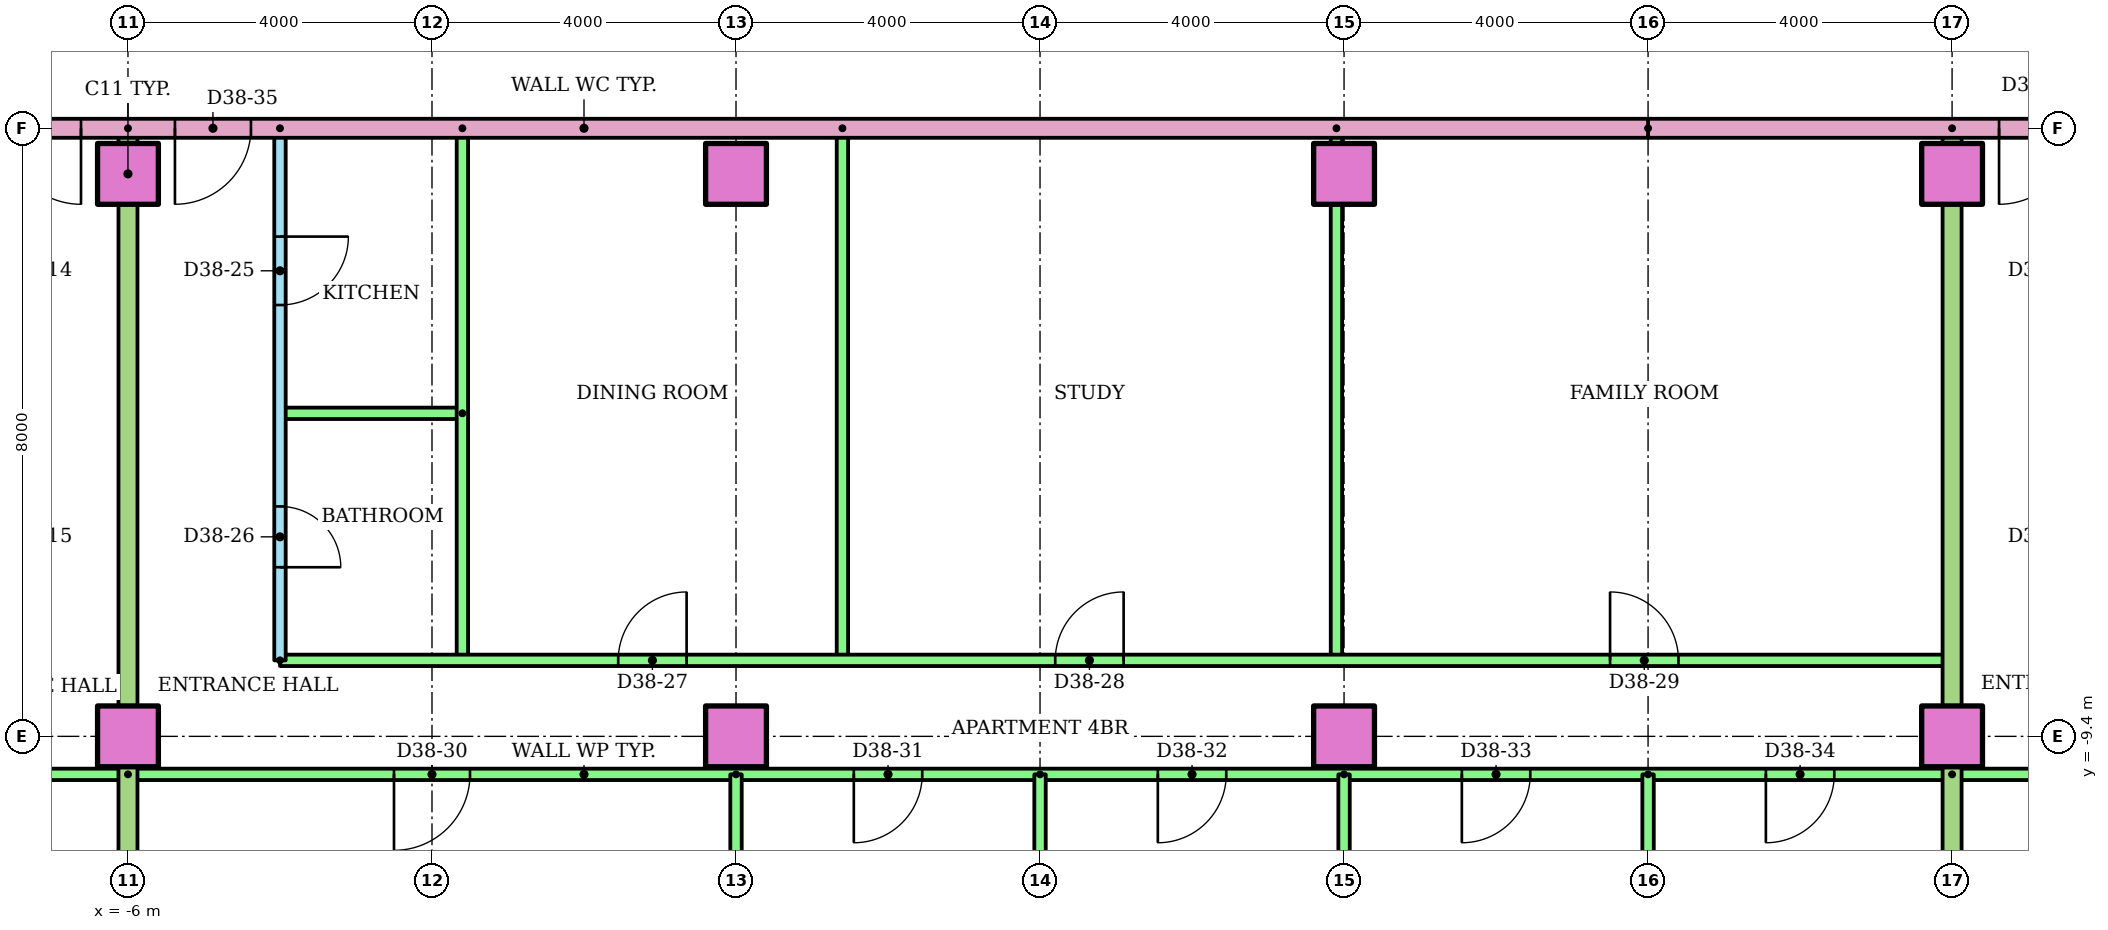
"""IFC4 building model, lengths in metres.
Left out: names, types, materials, properties, quantities, classifications, styles, units other than length and angle.
Written with IfcOpenShell. Run it as: python <this file> out.ifc"""

import sys

from ifc_helpers import new_model, si_unit, direction, frame, frame_2d, origin, origin_2d, place, context, subcontext, project, spatial, rectangle, extrude, element, fill, save


model = new_model("IFC4")
c1 = context("Model", 3, precision=1e-05, world=origin(), true_north=direction((0.0, 1.0)))
c2 = subcontext(c1, "Body", "Model", "MODEL_VIEW")
j1 = project(units=[si_unit("LENGTHUNIT", "METRE"), si_unit("PLANEANGLEUNIT", "RADIAN")], contexts=[c1])
p1 = place(None, origin())
s1 = spatial("IfcSite", under=j1, at=p1, CompositionType="ELEMENT")
p2 = place(p1, origin())
s2 = spatial("IfcBuilding", under=s1, at=p2, CompositionType="ELEMENT")
p3 = place(p2, frame((0.0, 0.0, 145.4)))
s3 = spatial("IfcBuildingStorey", under=s2, at=p3, CompositionType="ELEMENT", Elevation=145.4)
for number, where in (
    (1, (-6.0, -9.4, 0.0)),
    (2, (2.0, -9.4, 0.0)),
    (3, (10.0, -9.4, 0.0)),
    (4, (18.0, -9.4, 0.0)),
    (5, (-6.0, -2.0, 0.0)),
    (6, (2.0, -2.0, 0.0)),
    (7, (10.0, -2.0, 0.0)),
    (8, (18.0, -2.0, 0.0)),
):
    element("IfcColumn", number, at=place(p3, frame(where)), inside=s3, PredefinedType="COLUMN", context=c2, shape_type="SweptSolid", body=[
        extrude(rectangle(XDim=0.8, YDim=0.8, at=origin_2d()), origin(), (0.0, 0.0, 1.0), 3.2),
    ])
p4 = place(p3, frame((-6.0, -9.9, 0.0), z_axis=(0.0, 0.0, 1.0), x_axis=(-1.0, 0.0, 0.0)))
e9 = element("IfcWall", 9, at=p4, inside=s3, PredefinedType="PARTITIONING", context=c2, shape_type="SweptSolid", body=[
    extrude(rectangle(XDim=26.72, YDim=0.15, at=frame_2d((13.36, 0.0))), origin(), (0.0, 0.0, 1.0), 2.4),
])
p5 = place(p4, frame((20.75, 0.0, 0.0)))
e10 = element("IfcOpeningElement", 10, at=p5, cuts=e9, PredefinedType="OPENING", context=c2, shape_type="SweptSolid", body=[
    extrude(rectangle(XDim=1.0, YDim=2.1, at=frame_2d((0.5, 1.05))), frame((0.0, 0.085, 0.0), z_axis=(0.0, -1.0, 0.0), x_axis=(1.0, 0.0, 0.0)), (0.0, 0.0, 1.0), 0.17),
])
p6 = place(p4, frame((13.55, 0.0, 0.0)))
e11 = element("IfcOpeningElement", 11, at=p6, cuts=e9, PredefinedType="OPENING", context=c2, shape_type="SweptSolid", body=[
    extrude(rectangle(XDim=0.9, YDim=2.1, at=frame_2d((0.45, 1.05))), frame((0.0, 0.085, 0.0), z_axis=(0.0, -1.0, 0.0), x_axis=(1.0, 0.0, 0.0)), (0.0, 0.0, 1.0), 0.17),
])
p7 = place(p4, frame((9.55, 0.0, 0.0)))
e12 = element("IfcOpeningElement", 12, at=p7, cuts=e9, PredefinedType="OPENING", context=c2, shape_type="SweptSolid", body=[
    extrude(rectangle(XDim=0.9, YDim=2.1, at=frame_2d((0.45, 1.05))), frame((0.0, 0.085, 0.0), z_axis=(0.0, -1.0, 0.0), x_axis=(1.0, 0.0, 0.0)), (0.0, 0.0, 1.0), 0.17),
])
p8 = place(p4, frame((5.55, 0.0, 0.0)))
e13 = element("IfcOpeningElement", 13, at=p8, cuts=e9, PredefinedType="OPENING", context=c2, shape_type="SweptSolid", body=[
    extrude(rectangle(XDim=0.9, YDim=2.1, at=frame_2d((0.45, 1.05))), frame((0.0, 0.085, 0.0), z_axis=(0.0, -1.0, 0.0), x_axis=(1.0, 0.0, 0.0)), (0.0, 0.0, 1.0), 0.17),
])
p9 = place(p4, frame((1.55, 0.0, 0.0)))
e14 = element("IfcOpeningElement", 14, at=p9, cuts=e9, PredefinedType="OPENING", context=c2, shape_type="SweptSolid", body=[
    extrude(rectangle(XDim=0.9, YDim=2.1, at=frame_2d((0.45, 1.05))), frame((0.0, 0.085, 0.0), z_axis=(0.0, -1.0, 0.0), x_axis=(1.0, 0.0, 0.0)), (0.0, 0.0, 1.0), 0.17),
])
p10 = place(p3, frame((-4.0, -1.4, 0.0), z_axis=(0.0, 0.0, 1.0), x_axis=(0.0, -1.0, 0.0)))
e15 = element("IfcWall", 15, at=p10, inside=s3, PredefinedType="PARTITIONING", context=c2, shape_type="SweptSolid", body=[
    extrude(rectangle(XDim=7.0, YDim=0.15, at=frame_2d((3.5, 0.0))), origin(), (0.0, 0.0, 1.0), 2.4),
])
p11 = place(p10, frame((1.425, 0.0, 0.0)))
e16 = element("IfcOpeningElement", 16, at=p11, cuts=e15, PredefinedType="OPENING", context=c2, shape_type="SweptSolid", body=[
    extrude(rectangle(XDim=0.9, YDim=2.1, at=frame_2d((0.45, 1.05))), frame((0.0, 0.085, 0.0), z_axis=(0.0, -1.0, 0.0), x_axis=(1.0, 0.0, 0.0)), (0.0, 0.0, 1.0), 0.17),
])
p12 = place(p10, frame((4.975, 0.0, 0.0)))
e17 = element("IfcOpeningElement", 17, at=p12, cuts=e15, PredefinedType="OPENING", context=c2, shape_type="SweptSolid", body=[
    extrude(rectangle(XDim=0.8, YDim=2.1, at=frame_2d((0.4, 1.05))), frame((0.0, 0.085, 0.0), z_axis=(0.0, -1.0, 0.0), x_axis=(1.0, 0.0, 0.0)), (0.0, 0.0, 1.0), 0.17),
])
p13 = place(p3, frame((-1.6, -5.15, 0.0), z_axis=(0.0, 0.0, 1.0), x_axis=(-1.0, 0.0, 0.0)))
e18 = element("IfcWall", 18, at=p13, inside=s3, PredefinedType="PARTITIONING", context=c2, shape_type="SweptSolid", body=[
    extrude(rectangle(XDim=2.4, YDim=0.15, at=frame_2d((1.2, 0.0))), origin(), (0.0, 0.0, 1.0), 2.4),
])
for number, where, z_axis, x_axis in (
    (19, (-1.6, -1.4, 0.0), (0.0, 0.0, 1.0), (0.0, -1.0, 0.0)),
    (20, (3.4, -1.4, 0.0), (0.0, 0.0, 1.0), (0.0, -1.0, 0.0)),
    (21, (9.9, -1.4, 0.0), (0.0, 0.0, 1.0), (0.0, -1.0, 0.0)),
):
    element("IfcWall", number, at=place(p3, frame(where, z_axis=z_axis, x_axis=x_axis)), inside=s3, PredefinedType="PARTITIONING", context=c2, shape_type="SweptSolid", body=[
        extrude(rectangle(XDim=7.0, YDim=0.15, at=frame_2d((3.5, 0.0))), origin(), (0.0, 0.0, 1.0), 2.4),
    ])
p14 = place(p3, frame((-4.0, -8.4, 0.0)))
e22 = element("IfcWall", 22, at=p14, inside=s3, PredefinedType="PARTITIONING", context=c2, shape_type="SweptSolid", body=[
    extrude(rectangle(XDim=22.0, YDim=0.15, at=frame_2d((11.0, 0.0))), origin(), (0.0, 0.0, 1.0), 2.4),
])
p15 = place(p14, frame((4.45, 0.0, 0.0)))
e23 = element("IfcOpeningElement", 23, at=p15, cuts=e22, PredefinedType="OPENING", context=c2, shape_type="SweptSolid", body=[
    extrude(rectangle(XDim=0.9, YDim=2.1, at=frame_2d((0.45, 1.05))), frame((0.0, 0.085, 0.0), z_axis=(0.0, -1.0, 0.0), x_axis=(1.0, 0.0, 0.0)), (0.0, 0.0, 1.0), 0.17),
])
p16 = place(p14, frame((10.2, 0.0, 0.0)))
e24 = element("IfcOpeningElement", 24, at=p16, cuts=e22, PredefinedType="OPENING", context=c2, shape_type="SweptSolid", body=[
    extrude(rectangle(XDim=0.9, YDim=2.1, at=frame_2d((0.45, 1.05))), frame((0.0, 0.085, 0.0), z_axis=(0.0, -1.0, 0.0), x_axis=(1.0, 0.0, 0.0)), (0.0, 0.0, 1.0), 0.17),
])
p17 = place(p14, frame((17.5, 0.0, 0.0)))
e25 = element("IfcOpeningElement", 25, at=p17, cuts=e22, PredefinedType="OPENING", context=c2, shape_type="SweptSolid", body=[
    extrude(rectangle(XDim=0.9, YDim=2.1, at=frame_2d((0.45, 1.05))), frame((0.0, 0.085, 0.0), z_axis=(0.0, -1.0, 0.0), x_axis=(1.0, 0.0, 0.0)), (0.0, 0.0, 1.0), 0.17),
])
p18 = place(p3, frame((18.0, -9.9, 0.0), z_axis=(0.0, 0.0, 1.0), x_axis=(-1.0, 0.0, 0.0)))
e26 = element("IfcWall", 26, at=p18, inside=s3, PredefinedType="PARTITIONING", context=c2, shape_type="SweptSolid", body=[
    extrude(rectangle(XDim=24.0, YDim=0.15, at=frame_2d((12.0, 0.0))), origin(), (0.0, 0.0, 1.0), 2.4),
])
p19 = place(p18, frame((19.5, 0.0, 0.0)))
e27 = element("IfcOpeningElement", 27, at=p19, cuts=e26, PredefinedType="OPENING", context=c2, shape_type="SweptSolid", body=[
    extrude(rectangle(XDim=1.0, YDim=2.1, at=frame_2d((0.5, 1.05))), frame((0.0, 0.085, 0.0), z_axis=(0.0, -1.0, 0.0), x_axis=(1.0, 0.0, 0.0)), (0.0, 0.0, 1.0), 0.17),
])
p20 = place(p18, frame((13.55, 0.0, 0.0)))
e28 = element("IfcOpeningElement", 28, at=p20, cuts=e26, PredefinedType="OPENING", context=c2, shape_type="SweptSolid", body=[
    extrude(rectangle(XDim=0.9, YDim=2.1, at=frame_2d((0.45, 1.05))), frame((0.0, 0.085, 0.0), z_axis=(0.0, -1.0, 0.0), x_axis=(1.0, 0.0, 0.0)), (0.0, 0.0, 1.0), 0.17),
])
p21 = place(p18, frame((9.55, 0.0, 0.0)))
e29 = element("IfcOpeningElement", 29, at=p21, cuts=e26, PredefinedType="OPENING", context=c2, shape_type="SweptSolid", body=[
    extrude(rectangle(XDim=0.9, YDim=2.1, at=frame_2d((0.45, 1.05))), frame((0.0, 0.085, 0.0), z_axis=(0.0, -1.0, 0.0), x_axis=(1.0, 0.0, 0.0)), (0.0, 0.0, 1.0), 0.17),
])
p22 = place(p18, frame((5.55, 0.0, 0.0)))
e30 = element("IfcOpeningElement", 30, at=p22, cuts=e26, PredefinedType="OPENING", context=c2, shape_type="SweptSolid", body=[
    extrude(rectangle(XDim=0.9, YDim=2.1, at=frame_2d((0.45, 1.05))), frame((0.0, 0.085, 0.0), z_axis=(0.0, -1.0, 0.0), x_axis=(1.0, 0.0, 0.0)), (0.0, 0.0, 1.0), 0.17),
])
p23 = place(p18, frame((1.55, 0.0, 0.0)))
e31 = element("IfcOpeningElement", 31, at=p23, cuts=e26, PredefinedType="OPENING", context=c2, shape_type="SweptSolid", body=[
    extrude(rectangle(XDim=0.9, YDim=2.1, at=frame_2d((0.45, 1.05))), frame((0.0, 0.085, 0.0), z_axis=(0.0, -1.0, 0.0), x_axis=(1.0, 0.0, 0.0)), (0.0, 0.0, 1.0), 0.17),
])
p24 = place(p3, frame((2.0, -9.9, 0.0), z_axis=(0.0, 0.0, 1.0), x_axis=(0.0, -1.0, 0.0)))
e32 = element("IfcWall", 32, at=p24, inside=s3, PredefinedType="PARTITIONING", context=c2, shape_type="SweptSolid", body=[
    extrude(rectangle(XDim=6.41, YDim=0.15, at=frame_2d((3.205, 0.0))), origin(), (0.0, 0.0, 1.0), 2.4),
])
p25 = place(p3, frame((6.0, -9.9, 0.0), z_axis=(0.0, 0.0, 1.0), x_axis=(0.0, -1.0, 0.0)))
e33 = element("IfcWall", 33, at=p25, inside=s3, PredefinedType="PARTITIONING", context=c2, shape_type="SweptSolid", body=[
    extrude(rectangle(XDim=6.421, YDim=0.15, at=frame_2d((3.21, 0.0))), origin(), (0.0, 0.0, 1.0), 2.4),
])
p26 = place(p3, frame((10.0, -9.9, 0.0), z_axis=(0.0, 0.0, 1.0), x_axis=(0.0, -1.0, 0.0)))
e34 = element("IfcWall", 34, at=p26, inside=s3, PredefinedType="PARTITIONING", context=c2, shape_type="SweptSolid", body=[
    extrude(rectangle(XDim=6.41, YDim=0.15, at=frame_2d((3.205, 0.0))), origin(), (0.0, 0.0, 1.0), 2.4),
])
p27 = place(p3, frame((14.0, -9.9, 0.0), z_axis=(0.0, 0.0, 1.0), x_axis=(0.0, -1.0, 0.0)))
e35 = element("IfcWall", 35, at=p27, inside=s3, PredefinedType="PARTITIONING", context=c2, shape_type="SweptSolid", body=[
    extrude(rectangle(XDim=6.421, YDim=0.15, at=frame_2d((3.21, 0.0))), origin(), (0.0, 0.0, 1.0), 2.4),
])
p28 = place(p3, frame((-6.0, -1.4, 0.0), z_axis=(0.0, 0.0, 1.0), x_axis=(0.0, -1.0, 0.0)))
e36 = element("IfcWall", 36, at=p28, inside=s3, PredefinedType="PARTITIONING", context=c2, shape_type="SweptSolid", body=[
    extrude(rectangle(XDim=14.91, YDim=0.25, at=frame_2d((7.455, 0.0))), origin(), (0.0, 0.0, 1.0), 2.4),
])
p29 = place(p3, frame((32.72, -9.9, 0.0), z_axis=(0.0, 0.0, 1.0), x_axis=(-1.0, 0.0, 0.0)))
e37 = element("IfcWall", 37, at=p29, inside=s3, PredefinedType="PARTITIONING", context=c2, shape_type="SweptSolid", body=[
    extrude(rectangle(XDim=14.72, YDim=0.15, at=frame_2d((7.36, 0.0))), origin(), (0.0, 0.0, 1.0), 2.4),
])
p30 = place(p29, frame((12.27, 0.0, 0.0)))
e38 = element("IfcOpeningElement", 38, at=p30, cuts=e37, PredefinedType="OPENING", context=c2, shape_type="SweptSolid", body=[
    extrude(rectangle(XDim=0.9, YDim=2.1, at=frame_2d((0.45, 1.05))), frame((0.0, 0.085, 0.0), z_axis=(0.0, -1.0, 0.0), x_axis=(1.0, 0.0, 0.0)), (0.0, 0.0, 1.0), 0.17),
])
p31 = place(p29, frame((8.22, 0.0, 0.0)))
e39 = element("IfcOpeningElement", 39, at=p31, cuts=e37, PredefinedType="OPENING", context=c2, shape_type="SweptSolid", body=[
    extrude(rectangle(XDim=1.0, YDim=2.1, at=frame_2d((0.5, 1.05))), frame((0.0, 0.085, 0.0), z_axis=(0.0, -1.0, 0.0), x_axis=(1.0, 0.0, 0.0)), (0.0, 0.0, 1.0), 0.17),
])
p32 = place(p29, frame((3.02, 0.0, 0.0)))
e40 = element("IfcOpeningElement", 40, at=p32, cuts=e37, PredefinedType="OPENING", context=c2, shape_type="SweptSolid", body=[
    extrude(rectangle(XDim=0.9, YDim=2.1, at=frame_2d((0.45, 1.05))), frame((0.0, 0.085, 0.0), z_axis=(0.0, -1.0, 0.0), x_axis=(1.0, 0.0, 0.0)), (0.0, 0.0, 1.0), 0.17),
])
p33 = place(p3, frame((18.0, -1.4, 0.0), z_axis=(0.0, 0.0, 1.0), x_axis=(0.0, -1.0, 0.0)))
e41 = element("IfcWall", 41, at=p33, inside=s3, PredefinedType="PARTITIONING", context=c2, shape_type="SweptSolid", body=[
    extrude(rectangle(XDim=14.91, YDim=0.25, at=frame_2d((7.455, 0.0))), origin(), (0.0, 0.0, 1.0), 2.4),
])
p34 = place(p3, frame((29.0, -1.4, 0.0), z_axis=(0.0, 0.0, 1.0), x_axis=(-1.0, 0.0, 0.0)))
e42 = element("IfcWall", 42, at=p34, inside=s3, PredefinedType="PARTITIONING", context=c2, shape_type="SweptSolid", body=[
    extrude(rectangle(XDim=15.0, YDim=0.25, at=frame_2d((7.5, 0.0))), origin(), (0.0, 0.0, 1.0), 2.4),
])
p35 = place(p34, frame((9.382, 0.0, 0.0)))
e43 = element("IfcOpeningElement", 43, at=p35, cuts=e42, PredefinedType="OPENING", context=c2, shape_type="SweptSolid", body=[
    extrude(rectangle(XDim=1.0, YDim=2.1, at=frame_2d((0.5, 1.05))), frame((0.0, 0.135, 0.0), z_axis=(0.0, -1.0, 0.0), x_axis=(1.0, 0.0, 0.0)), (0.0, 0.0, 1.0), 0.27),
])
p36 = place(p3, frame((14.0, -1.4, 0.0), z_axis=(0.0, 0.0, 1.0), x_axis=(-1.0, 0.0, 0.0)))
e44 = element("IfcWall", 44, at=p36, inside=s3, PredefinedType="PARTITIONING", context=c2, shape_type="SweptSolid", body=[
    extrude(rectangle(XDim=28.0, YDim=0.25, at=frame_2d((14.0, 0.0))), origin(), (0.0, 0.0, 1.0), 2.4),
])
p37 = place(p36, frame((20.618, 0.0, 0.0)))
e45 = element("IfcOpeningElement", 45, at=p37, cuts=e44, PredefinedType="OPENING", context=c2, shape_type="SweptSolid", body=[
    extrude(rectangle(XDim=1.0, YDim=2.1, at=frame_2d((0.5, 1.05))), frame((0.0, 0.135, 0.0), z_axis=(0.0, -1.0, 0.0), x_axis=(1.0, 0.0, 0.0)), (0.0, 0.0, 1.0), 0.27),
])
p38 = place(p36, frame((18.382, 0.0, 0.0)))
e46 = element("IfcOpeningElement", 46, at=p38, cuts=e44, PredefinedType="OPENING", context=c2, shape_type="SweptSolid", body=[
    extrude(rectangle(XDim=1.0, YDim=2.1, at=frame_2d((0.5, 1.05))), frame((0.0, 0.135, 0.0), z_axis=(0.0, -1.0, 0.0), x_axis=(1.0, 0.0, 0.0)), (0.0, 0.0, 1.0), 0.27),
])
p39 = place(p37, origin())
e47 = element("IfcDoor", 47, at=p39, inside=s3, OperationType="SINGLE_SWING_LEFT", PredefinedType="DOOR", context=c2, shape_type="SweptSolid", body=[
    extrude(rectangle(XDim=1.0, YDim=2.1, at=frame_2d((0.5, 1.05))), frame((0.0, 0.025, 0.0), z_axis=(0.0, -1.0, 0.0), x_axis=(1.0, 0.0, 0.0)), (0.0, 0.0, 1.0), 0.05),
])
fill(e45, e47)
p40 = place(p11, origin())
e48 = element("IfcDoor", 48, at=p40, inside=s3, OperationType="SINGLE_SWING_LEFT", PredefinedType="DOOR", context=c2, shape_type="SweptSolid", body=[
    extrude(rectangle(XDim=0.9, YDim=2.1, at=frame_2d((0.45, 1.05))), frame((0.0, 0.025, 0.0), z_axis=(0.0, -1.0, 0.0), x_axis=(1.0, 0.0, 0.0)), (0.0, 0.0, 1.0), 0.05),
])
fill(e16, e48)
p41 = place(p12, origin())
e49 = element("IfcDoor", 49, at=p41, inside=s3, OperationType="SINGLE_SWING_RIGHT", PredefinedType="DOOR", context=c2, shape_type="SweptSolid", body=[
    extrude(rectangle(XDim=0.8, YDim=2.1, at=frame_2d((0.4, 1.05))), frame((0.0, 0.025, 0.0), z_axis=(0.0, -1.0, 0.0), x_axis=(1.0, 0.0, 0.0)), (0.0, 0.0, 1.0), 0.05),
])
fill(e17, e49)
p42 = place(p15, origin())
e50 = element("IfcDoor", 50, at=p42, inside=s3, OperationType="SINGLE_SWING_RIGHT", PredefinedType="DOOR", context=c2, shape_type="SweptSolid", body=[
    extrude(rectangle(XDim=0.9, YDim=2.1, at=frame_2d((0.45, 1.05))), frame((0.0, 0.025, 0.0), z_axis=(0.0, -1.0, 0.0), x_axis=(1.0, 0.0, 0.0)), (0.0, 0.0, 1.0), 0.05),
])
fill(e23, e50)
p43 = place(p16, origin())
e51 = element("IfcDoor", 51, at=p43, inside=s3, OperationType="SINGLE_SWING_RIGHT", PredefinedType="DOOR", context=c2, shape_type="SweptSolid", body=[
    extrude(rectangle(XDim=0.9, YDim=2.1, at=frame_2d((0.45, 1.05))), frame((0.0, 0.025, 0.0), z_axis=(0.0, -1.0, 0.0), x_axis=(1.0, 0.0, 0.0)), (0.0, 0.0, 1.0), 0.05),
])
fill(e24, e51)
p44 = place(p17, origin())
e52 = element("IfcDoor", 52, at=p44, inside=s3, OperationType="SINGLE_SWING_LEFT", PredefinedType="DOOR", context=c2, shape_type="SweptSolid", body=[
    extrude(rectangle(XDim=0.9, YDim=2.1, at=frame_2d((0.45, 1.05))), frame((0.0, 0.025, 0.0), z_axis=(0.0, -1.0, 0.0), x_axis=(1.0, 0.0, 0.0)), (0.0, 0.0, 1.0), 0.05),
])
fill(e25, e52)
p45 = place(p19, origin())
e53 = element("IfcDoor", 53, at=p45, inside=s3, OperationType="SINGLE_SWING_RIGHT", PredefinedType="DOOR", context=c2, shape_type="SweptSolid", body=[
    extrude(rectangle(XDim=1.0, YDim=2.1, at=frame_2d((0.5, 1.05))), frame((0.0, 0.025, 0.0), z_axis=(0.0, -1.0, 0.0), x_axis=(1.0, 0.0, 0.0)), (0.0, 0.0, 1.0), 0.05),
])
fill(e27, e53)
p46 = place(p20, origin())
e54 = element("IfcDoor", 54, at=p46, inside=s3, OperationType="SINGLE_SWING_RIGHT", PredefinedType="DOOR", context=c2, shape_type="SweptSolid", body=[
    extrude(rectangle(XDim=0.9, YDim=2.1, at=frame_2d((0.45, 1.05))), frame((0.0, 0.025, 0.0), z_axis=(0.0, -1.0, 0.0), x_axis=(1.0, 0.0, 0.0)), (0.0, 0.0, 1.0), 0.05),
])
fill(e28, e54)
p47 = place(p21, origin())
e55 = element("IfcDoor", 55, at=p47, inside=s3, OperationType="SINGLE_SWING_RIGHT", PredefinedType="DOOR", context=c2, shape_type="SweptSolid", body=[
    extrude(rectangle(XDim=0.9, YDim=2.1, at=frame_2d((0.45, 1.05))), frame((0.0, 0.025, 0.0), z_axis=(0.0, -1.0, 0.0), x_axis=(1.0, 0.0, 0.0)), (0.0, 0.0, 1.0), 0.05),
])
fill(e29, e55)
p48 = place(p22, origin())
e56 = element("IfcDoor", 56, at=p48, inside=s3, OperationType="SINGLE_SWING_RIGHT", PredefinedType="DOOR", context=c2, shape_type="SweptSolid", body=[
    extrude(rectangle(XDim=0.9, YDim=2.1, at=frame_2d((0.45, 1.05))), frame((0.0, 0.025, 0.0), z_axis=(0.0, -1.0, 0.0), x_axis=(1.0, 0.0, 0.0)), (0.0, 0.0, 1.0), 0.05),
])
fill(e30, e56)
p49 = place(p23, origin())
e57 = element("IfcDoor", 57, at=p49, inside=s3, OperationType="SINGLE_SWING_RIGHT", PredefinedType="DOOR", context=c2, shape_type="SweptSolid", body=[
    extrude(rectangle(XDim=0.9, YDim=2.1, at=frame_2d((0.45, 1.05))), frame((0.0, 0.025, 0.0), z_axis=(0.0, -1.0, 0.0), x_axis=(1.0, 0.0, 0.0)), (0.0, 0.0, 1.0), 0.05),
])
fill(e31, e57)
p50 = place(p38, origin())
e58 = element("IfcDoor", 58, at=p50, inside=s3, OperationType="SINGLE_SWING_RIGHT", PredefinedType="DOOR", context=c2, shape_type="SweptSolid", body=[
    extrude(rectangle(XDim=1.0, YDim=2.1, at=frame_2d((0.5, 1.05))), frame((0.0, 0.025, 0.0), z_axis=(0.0, -1.0, 0.0), x_axis=(1.0, 0.0, 0.0)), (0.0, 0.0, 1.0), 0.05),
])
fill(e46, e58)
p51 = place(p35, origin())
e59 = element("IfcDoor", 59, at=p51, inside=s3, OperationType="SINGLE_SWING_RIGHT", PredefinedType="DOOR", context=c2, shape_type="SweptSolid", body=[
    extrude(rectangle(XDim=1.0, YDim=2.1, at=frame_2d((0.5, 1.05))), frame((0.0, 0.025, 0.0), z_axis=(0.0, -1.0, 0.0), x_axis=(1.0, 0.0, 0.0)), (0.0, 0.0, 1.0), 0.05),
])
fill(e43, e59)
save(model, sys.argv[1])
